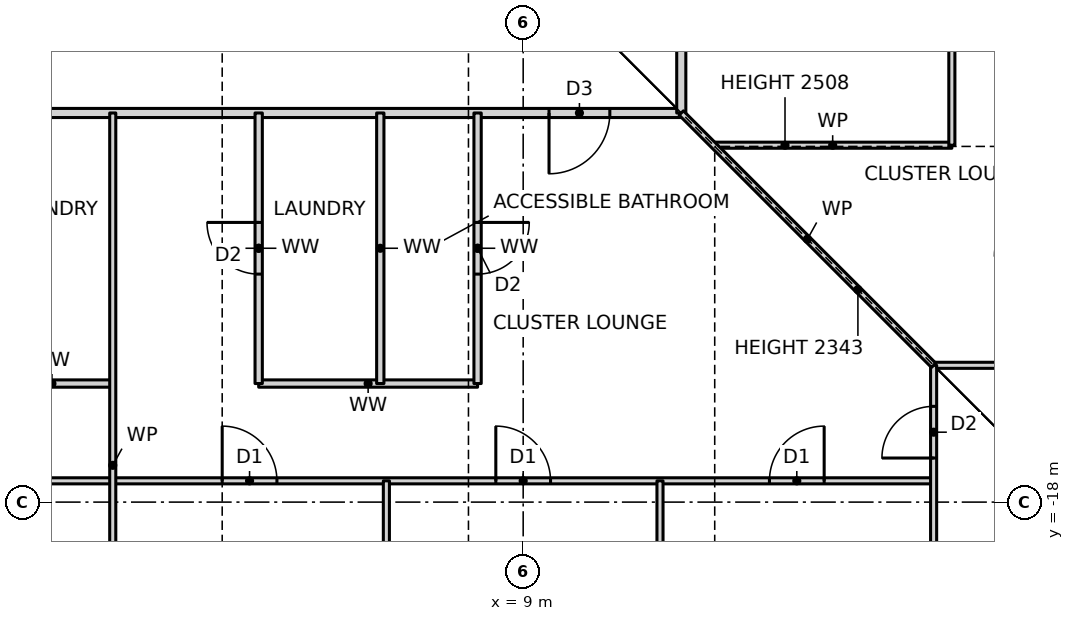
"""IFC4 building model, lengths in metres.
Left out: names, types, materials, properties, quantities, classifications, styles, units other than length and angle.
Written with IfcOpenShell. Run it as: python <this file> out.ifc"""

import sys

from ifc_helpers import new_model, si_unit, direction, frame, frame_2d, origin, place, context, subcontext, project, spatial, rectangle, extrude, element, fill, save


model = new_model("IFC4")
c1 = context("Model", 3, precision=1e-05, world=origin(), true_north=direction((0.0, 1.0)))
c2 = subcontext(c1, "Body", "Model", "MODEL_VIEW")
j1 = project(units=[si_unit("LENGTHUNIT", "METRE"), si_unit("PLANEANGLEUNIT", "RADIAN")], contexts=[c1])
p1 = place(None, origin())
s1 = spatial("IfcSite", under=j1, at=p1, CompositionType="ELEMENT")
p2 = place(p1, origin())
s2 = spatial("IfcBuilding", under=s1, at=p2, CompositionType="ELEMENT")
p3 = place(p2, frame((0.0, 0.0, 64.0)))
s3 = spatial("IfcBuildingStorey", under=s2, at=p3, CompositionType="ELEMENT", Elevation=64.0)
p4 = place(p3, frame((-15.75, -17.65, 0.0), z_axis=(0.0, 0.0, 1.0), x_axis=(1.0, 0.0, 0.0)))
e1 = element("IfcWall", 1, at=p4, inside=s3, PredefinedType="PARTITIONING", context=c2, shape_type="SweptSolid", body=[
    extrude(rectangle(XDim=31.5, YDim=0.1, at=frame_2d((15.75, 0.0))), origin(), (0.0, 0.0, 1.0), 3.27),
])
p5 = place(p4, frame((1.8, 0.0, 0.0)))
e2 = element("IfcOpeningElement", 2, at=p5, cuts=e1, PredefinedType="OPENING", context=c2, shape_type="SweptSolid", body=[
    extrude(rectangle(XDim=0.9, YDim=2.1, at=frame_2d((0.45, 1.05))), frame((0.0, 0.06, 0.0), z_axis=(0.0, -1.0, 0.0), x_axis=(1.0, 0.0, 0.0)), (0.0, 0.0, 1.0), 0.12),
])
p6 = place(p4, frame((6.3, 0.0, 0.0)))
e3 = element("IfcOpeningElement", 3, at=p6, cuts=e1, PredefinedType="OPENING", context=c2, shape_type="SweptSolid", body=[
    extrude(rectangle(XDim=0.9, YDim=2.1, at=frame_2d((0.45, 1.05))), frame((0.0, 0.06, 0.0), z_axis=(0.0, -1.0, 0.0), x_axis=(1.0, 0.0, 0.0)), (0.0, 0.0, 1.0), 0.12),
])
p7 = place(p4, frame((10.8, 0.0, 0.0)))
e4 = element("IfcOpeningElement", 4, at=p7, cuts=e1, PredefinedType="OPENING", context=c2, shape_type="SweptSolid", body=[
    extrude(rectangle(XDim=0.9, YDim=2.1, at=frame_2d((0.45, 1.05))), frame((0.0, 0.06, 0.0), z_axis=(0.0, -1.0, 0.0), x_axis=(1.0, 0.0, 0.0)), (0.0, 0.0, 1.0), 0.12),
])
p8 = place(p4, frame((15.3, 0.0, 0.0)))
e5 = element("IfcOpeningElement", 5, at=p8, cuts=e1, PredefinedType="OPENING", context=c2, shape_type="SweptSolid", body=[
    extrude(rectangle(XDim=0.9, YDim=2.1, at=frame_2d((0.45, 1.05))), frame((0.0, 0.06, 0.0), z_axis=(0.0, -1.0, 0.0), x_axis=(1.0, 0.0, 0.0)), (0.0, 0.0, 1.0), 0.12),
])
p9 = place(p4, frame((19.8, 0.0, 0.0)))
e6 = element("IfcOpeningElement", 6, at=p9, cuts=e1, PredefinedType="OPENING", context=c2, shape_type="SweptSolid", body=[
    extrude(rectangle(XDim=0.9, YDim=2.1, at=frame_2d((0.45, 1.05))), frame((0.0, 0.06, 0.0), z_axis=(0.0, -1.0, 0.0), x_axis=(1.0, 0.0, 0.0)), (0.0, 0.0, 1.0), 0.12),
])
p10 = place(p4, frame((24.3, 0.0, 0.0)))
e7 = element("IfcOpeningElement", 7, at=p10, cuts=e1, PredefinedType="OPENING", context=c2, shape_type="SweptSolid", body=[
    extrude(rectangle(XDim=0.9, YDim=2.1, at=frame_2d((0.45, 1.05))), frame((0.0, 0.06, 0.0), z_axis=(0.0, -1.0, 0.0), x_axis=(1.0, 0.0, 0.0)), (0.0, 0.0, 1.0), 0.12),
])
p11 = place(p4, frame((28.8, 0.0, 0.0)))
e8 = element("IfcOpeningElement", 8, at=p11, cuts=e1, PredefinedType="OPENING", context=c2, shape_type="SweptSolid", body=[
    extrude(rectangle(XDim=0.9, YDim=2.1, at=frame_2d((0.45, 1.05))), frame((0.0, 0.06, 0.0), z_axis=(0.0, -1.0, 0.0), x_axis=(1.0, 0.0, 0.0)), (0.0, 0.0, 1.0), 0.12),
])
p12 = place(p3, frame((0.25, -16.05, 0.0), z_axis=(0.0, 0.0, 1.0), x_axis=(1.0, 0.0, 0.0)))
e9 = element("IfcWall", 9, at=p12, inside=s3, PredefinedType="PARTITIONING", context=c2, shape_type="SweptSolid", body=[
    extrude(rectangle(XDim=2.0, YDim=0.12, at=frame_2d((1.0, 0.0))), origin(), (0.0, 0.0, 1.0), 3.27),
])
p13 = place(p3, frame((4.65, -16.05, 0.0), z_axis=(0.0, 0.0, 1.0), x_axis=(1.0, 0.0, 0.0)))
e10 = element("IfcWall", 10, at=p13, inside=s3, PredefinedType="PARTITIONING", context=c2, shape_type="SweptSolid", body=[
    extrude(rectangle(XDim=3.6, YDim=0.12, at=frame_2d((1.8, 0.0))), origin(), (0.0, 0.0, 1.0), 3.27),
])
p14 = place(p3, frame((15.75, -15.75, 0.0), z_axis=(0.0, 0.0, 1.0), x_axis=(1.0, 0.0, 0.0)))
e11 = element("IfcWall", 11, at=p14, inside=s3, PredefinedType="PARTITIONING", context=c2, shape_type="SweptSolid", body=[
    extrude(rectangle(XDim=7.44, YDim=0.1, at=frame_2d((3.72, 0.0))), origin(), (0.0, 0.0, 1.0), 3.27),
])
p15 = place(p3, frame((12.13, -12.13, 0.0), z_axis=(0.0, 0.0, 1.0), x_axis=(1.0, 0.0, 0.0)))
e12 = element("IfcWall", 12, at=p15, inside=s3, PredefinedType="PARTITIONING", context=c2, shape_type="SweptSolid", body=[
    extrude(rectangle(XDim=3.92, YDim=0.1, at=frame_2d((1.96, 0.0))), origin(), (0.0, 0.0, 1.0), 2.508),
])
p16 = place(p3, frame((-11.6, -11.6, 0.0), z_axis=(0.0, 0.0, 1.0), x_axis=(1.0, 0.0, 0.0)))
e13 = element("IfcWall", 13, at=p16, inside=s3, PredefinedType="PARTITIONING", context=c2, shape_type="SweptSolid", body=[
    extrude(rectangle(XDim=23.2, YDim=0.15, at=frame_2d((11.6, 0.0))), origin(), (0.0, 0.0, 1.0), 3.27),
])
p17 = place(p16, frame((1.755, 0.0, 0.0)))
e14 = element("IfcOpeningElement", 14, at=p17, cuts=e13, PredefinedType="OPENING", context=c2, shape_type="SweptSolid", body=[
    extrude(rectangle(XDim=1.0, YDim=2.1, at=frame_2d((0.5, 1.05))), frame((0.0, 0.085, 0.0), z_axis=(0.0, -1.0, 0.0), x_axis=(1.0, 0.0, 0.0)), (0.0, 0.0, 1.0), 0.17),
])
p18 = place(p16, frame((21.025, 0.0, 0.0)))
e15 = element("IfcOpeningElement", 15, at=p18, cuts=e13, PredefinedType="OPENING", context=c2, shape_type="SweptSolid", body=[
    extrude(rectangle(XDim=1.0, YDim=2.1, at=frame_2d((0.5, 1.05))), frame((0.0, 0.085, 0.0), z_axis=(0.0, -1.0, 0.0), x_axis=(1.0, 0.0, 0.0)), (0.0, 0.0, 1.0), 0.17),
])
p19 = place(p3, frame((16.05, -12.13, 0.0), z_axis=(0.0, 0.0, 1.0), x_axis=(0.0, 1.0, 0.0)))
e16 = element("IfcWall", 16, at=p19, inside=s3, PredefinedType="PARTITIONING", context=c2, shape_type="SweptSolid", body=[
    extrude(rectangle(XDim=14.08, YDim=0.1, at=frame_2d((7.04, 0.0))), origin(), (0.0, 0.0, 1.0), 3.27),
])
p20 = place(p19, frame((6.615, 0.0, 0.0)))
e17 = element("IfcOpeningElement", 17, at=p20, cuts=e16, PredefinedType="OPENING", context=c2, shape_type="SweptSolid", body=[
    extrude(rectangle(XDim=0.85, YDim=2.1, at=frame_2d((0.425, 1.05))), frame((0.0, 0.06, 0.0), z_axis=(0.0, -1.0, 0.0), x_axis=(1.0, 0.0, 0.0)), (0.0, 0.0, 1.0), 0.12),
])
p21 = place(p3, frame((15.75, -23.19, 0.0), z_axis=(0.0, 0.0, 1.0), x_axis=(0.0, 1.0, 0.0)))
e18 = element("IfcWall", 18, at=p21, inside=s3, PredefinedType="PARTITIONING", context=c2, shape_type="SweptSolid", body=[
    extrude(rectangle(XDim=7.44, YDim=0.1, at=frame_2d((3.72, 0.0))), origin(), (0.0, 0.0, 1.0), 3.27),
])
p22 = place(p21, frame((5.915, 0.0, 0.0)))
e19 = element("IfcOpeningElement", 19, at=p22, cuts=e18, PredefinedType="OPENING", context=c2, shape_type="SweptSolid", body=[
    extrude(rectangle(XDim=0.85, YDim=2.1, at=frame_2d((0.425, 1.05))), frame((0.0, 0.06, 0.0), z_axis=(0.0, -1.0, 0.0), x_axis=(1.0, 0.0, 0.0)), (0.0, 0.0, 1.0), 0.12),
])
p23 = place(p3, frame((11.6, -11.6, 0.0), z_axis=(0.0, 0.0, 1.0), x_axis=(0.0, 1.0, 0.0)))
e20 = element("IfcWall", 20, at=p23, inside=s3, PredefinedType="PARTITIONING", context=c2, shape_type="SweptSolid", body=[
    extrude(rectangle(XDim=24.2, YDim=0.15, at=frame_2d((12.1, 0.0))), origin(), (0.0, 0.0, 1.0), 3.27),
])
p24 = place(p23, frame((14.25, 0.0, 0.0)))
e21 = element("IfcOpeningElement", 21, at=p24, cuts=e20, PredefinedType="OPENING", context=c2, shape_type="SweptSolid", body=[
    extrude(rectangle(XDim=1.0, YDim=2.1, at=frame_2d((0.5, 1.05))), frame((0.0, 0.085, 0.0), z_axis=(0.0, -1.0, 0.0), x_axis=(1.0, 0.0, 0.0)), (0.0, 0.0, 1.0), 0.17),
])
p25 = place(p23, frame((16.4, 0.0, 0.0)))
e22 = element("IfcOpeningElement", 22, at=p25, cuts=e20, PredefinedType="OPENING", context=c2, shape_type="SweptSolid", body=[
    extrude(rectangle(XDim=0.9, YDim=2.1, at=frame_2d((0.45, 1.05))), frame((0.0, 0.085, 0.0), z_axis=(0.0, -1.0, 0.0), x_axis=(1.0, 0.0, 0.0)), (0.0, 0.0, 1.0), 0.17),
])
p26 = place(p3, frame((11.25, -23.19, 0.0), z_axis=(0.0, 0.0, 1.0), x_axis=(0.0, 1.0, 0.0)))
e23 = element("IfcWall", 23, at=p26, inside=s3, PredefinedType="PARTITIONING", context=c2, shape_type="SweptSolid", body=[
    extrude(rectangle(XDim=5.54, YDim=0.1, at=frame_2d((2.77, 0.0))), origin(), (0.0, 0.0, 1.0), 3.27),
])
p27 = place(p3, frame((8.25, -16.05, 0.0), z_axis=(0.0, 0.0, 1.0), x_axis=(0.0, 1.0, 0.0)))
e24 = element("IfcWall", 24, at=p27, inside=s3, PredefinedType="PARTITIONING", context=c2, shape_type="SweptSolid", body=[
    extrude(rectangle(XDim=4.45, YDim=0.12, at=frame_2d((2.225, 0.0))), origin(), (0.0, 0.0, 1.0), 3.27),
])
p28 = place(p27, frame((1.8, 0.0, 0.0)))
e25 = element("IfcOpeningElement", 25, at=p28, cuts=e24, PredefinedType="OPENING", context=c2, shape_type="SweptSolid", body=[
    extrude(rectangle(XDim=0.85, YDim=2.1, at=frame_2d((0.425, 1.05))), frame((0.0, 0.07, 0.0), z_axis=(0.0, -1.0, 0.0), x_axis=(1.0, 0.0, 0.0)), (0.0, 0.0, 1.0), 0.14),
])
p29 = place(p3, frame((6.75, -23.19, 0.0), z_axis=(0.0, 0.0, 1.0), x_axis=(0.0, 1.0, 0.0)))
e26 = element("IfcWall", 26, at=p29, inside=s3, PredefinedType="PARTITIONING", context=c2, shape_type="SweptSolid", body=[
    extrude(rectangle(XDim=5.54, YDim=0.1, at=frame_2d((2.77, 0.0))), origin(), (0.0, 0.0, 1.0), 3.27),
])
p30 = place(p3, frame((6.65, -16.05, 0.0), z_axis=(0.0, 0.0, 1.0), x_axis=(0.0, 1.0, 0.0)))
e27 = element("IfcWall", 27, at=p30, inside=s3, PredefinedType="PARTITIONING", context=c2, shape_type="SweptSolid", body=[
    extrude(rectangle(XDim=4.45, YDim=0.12, at=frame_2d((2.225, 0.0))), origin(), (0.0, 0.0, 1.0), 3.27),
])
p31 = place(p3, frame((4.65, -16.05, 0.0), z_axis=(0.0, 0.0, 1.0), x_axis=(0.0, 1.0, 0.0)))
e28 = element("IfcWall", 28, at=p31, inside=s3, PredefinedType="PARTITIONING", context=c2, shape_type="SweptSolid", body=[
    extrude(rectangle(XDim=4.45, YDim=0.12, at=frame_2d((2.225, 0.0))), origin(), (0.0, 0.0, 1.0), 3.27),
])
p32 = place(p31, frame((1.8, 0.0, 0.0)))
e29 = element("IfcOpeningElement", 29, at=p32, cuts=e28, PredefinedType="OPENING", context=c2, shape_type="SweptSolid", body=[
    extrude(rectangle(XDim=0.85, YDim=2.1, at=frame_2d((0.425, 1.05))), frame((0.0, 0.07, 0.0), z_axis=(0.0, -1.0, 0.0), x_axis=(1.0, 0.0, 0.0)), (0.0, 0.0, 1.0), 0.14),
])
p33 = place(p3, frame((2.25, -23.19, 0.0), z_axis=(0.0, 0.0, 1.0), x_axis=(0.0, 1.0, 0.0)))
e30 = element("IfcWall", 30, at=p33, inside=s3, PredefinedType="PARTITIONING", context=c2, shape_type="SweptSolid", body=[
    extrude(rectangle(XDim=11.59, YDim=0.1, at=frame_2d((5.795, 0.0))), origin(), (0.0, 0.0, 1.0), 3.27),
])
p34 = place(p3, frame((15.75, -15.75, 0.0), z_axis=(0.0, 0.0, 1.0), x_axis=(-0.707106781187, 0.707106781187, 0.0)))
e31 = element("IfcWall", 31, at=p34, inside=s3, PredefinedType="PARTITIONING", context=c2, shape_type="SweptSolid", body=[
    extrude(rectangle(XDim=5.869, YDim=0.1, at=frame_2d((2.935, 0.0))), origin(), (0.0, 0.0, 1.0), 2.343),
])
p35 = place(p9, origin())
e32 = element("IfcDoor", 32, at=p35, inside=s3, OperationType="SINGLE_SWING_LEFT", PredefinedType="DOOR", context=c2, shape_type="SweptSolid", body=[
    extrude(rectangle(XDim=0.9, YDim=2.1, at=frame_2d((0.45, 1.05))), frame((0.0, 0.025, 0.0), z_axis=(0.0, -1.0, 0.0), x_axis=(1.0, 0.0, 0.0)), (0.0, 0.0, 1.0), 0.05),
])
fill(e6, e32)
p36 = place(p10, origin())
e33 = element("IfcDoor", 33, at=p36, inside=s3, OperationType="SINGLE_SWING_LEFT", PredefinedType="DOOR", context=c2, shape_type="SweptSolid", body=[
    extrude(rectangle(XDim=0.9, YDim=2.1, at=frame_2d((0.45, 1.05))), frame((0.0, 0.025, 0.0), z_axis=(0.0, -1.0, 0.0), x_axis=(1.0, 0.0, 0.0)), (0.0, 0.0, 1.0), 0.05),
])
fill(e7, e33)
p37 = place(p11, origin())
e34 = element("IfcDoor", 34, at=p37, inside=s3, OperationType="SINGLE_SWING_RIGHT", PredefinedType="DOOR", context=c2, shape_type="SweptSolid", body=[
    extrude(rectangle(XDim=0.9, YDim=2.1, at=frame_2d((0.45, 1.05))), frame((0.0, 0.025, 0.0), z_axis=(0.0, -1.0, 0.0), x_axis=(1.0, 0.0, 0.0)), (0.0, 0.0, 1.0), 0.05),
])
fill(e8, e34)
p38 = place(p18, frame((1.0, 0.0, 0.0), z_axis=(0.0, 0.0, 1.0), x_axis=(-1.0, 0.0, 0.0)))
e35 = element("IfcDoor", 35, at=p38, inside=s3, OperationType="SINGLE_SWING_RIGHT", PredefinedType="DOOR", context=c2, shape_type="SweptSolid", body=[
    extrude(rectangle(XDim=1.0, YDim=2.1, at=frame_2d((0.5, 1.05))), frame((0.0, 0.025, 0.0), z_axis=(0.0, -1.0, 0.0), x_axis=(1.0, 0.0, 0.0)), (0.0, 0.0, 1.0), 0.05),
])
fill(e15, e35)
p39 = place(p32, origin())
e36 = element("IfcDoor", 36, at=p39, inside=s3, OperationType="SINGLE_SWING_RIGHT", PredefinedType="DOOR", context=c2, shape_type="SweptSolid", body=[
    extrude(rectangle(XDim=0.85, YDim=2.1, at=frame_2d((0.425, 1.05))), frame((0.0, 0.025, 0.0), z_axis=(0.0, -1.0, 0.0), x_axis=(1.0, 0.0, 0.0)), (0.0, 0.0, 1.0), 0.05),
])
fill(e29, e36)
p40 = place(p28, frame((0.85, 0.0, 0.0), z_axis=(0.0, 0.0, 1.0), x_axis=(-1.0, 0.0, 0.0)))
e37 = element("IfcDoor", 37, at=p40, inside=s3, OperationType="SINGLE_SWING_LEFT", PredefinedType="DOOR", context=c2, shape_type="SweptSolid", body=[
    extrude(rectangle(XDim=0.85, YDim=2.1, at=frame_2d((0.425, 1.05))), frame((0.0, 0.025, 0.0), z_axis=(0.0, -1.0, 0.0), x_axis=(1.0, 0.0, 0.0)), (0.0, 0.0, 1.0), 0.05),
])
fill(e25, e37)
p41 = place(p22, origin())
e38 = element("IfcDoor", 38, at=p41, inside=s3, OperationType="SINGLE_SWING_LEFT", PredefinedType="DOOR", context=c2, shape_type="SweptSolid", body=[
    extrude(rectangle(XDim=0.85, YDim=2.1, at=frame_2d((0.425, 1.05))), frame((0.0, 0.025, 0.0), z_axis=(0.0, -1.0, 0.0), x_axis=(1.0, 0.0, 0.0)), (0.0, 0.0, 1.0), 0.05),
])
fill(e19, e38)
save(model, sys.argv[1])
